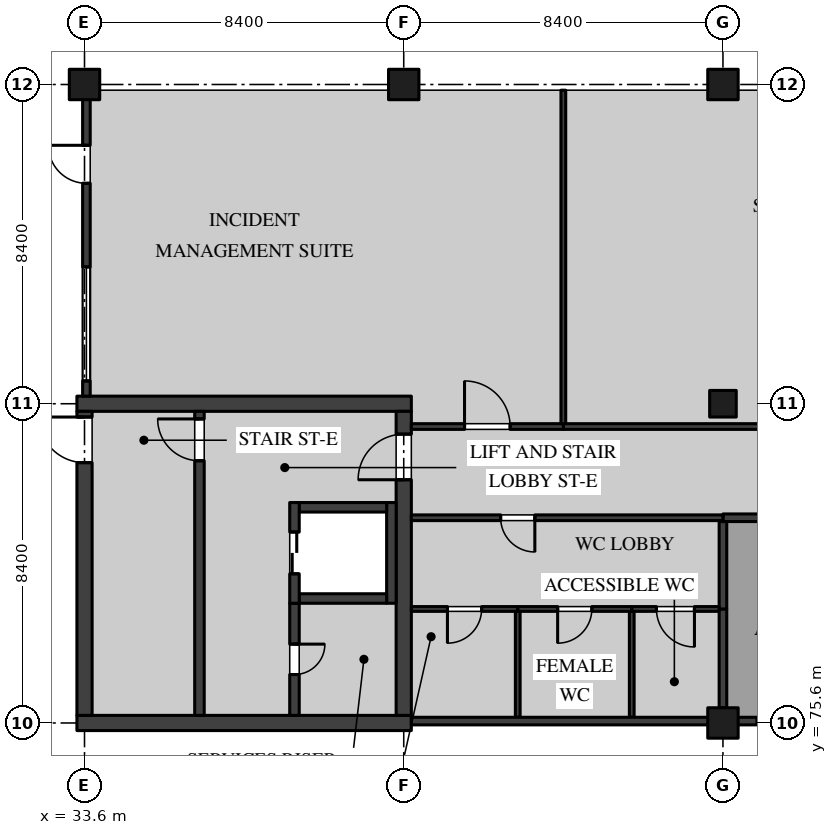
"""IFC4 building model, lengths in metres.
Left out: names, types, materials, properties, quantities, classifications, styles, units other than length and angle.
Written with IfcOpenShell. Run it as: python <this file> out.ifc"""

import sys

from ifc_helpers import new_model, si_unit, direction, frame, frame_2d, origin, origin_2d, place, context, subcontext, project, spatial, rectangle, extrude, element, fill, save


model = new_model("IFC4")
c1 = context("Model", 3, precision=1e-05, world=origin(), true_north=direction((0.0, 1.0)))
c2 = subcontext(c1, "Body", "Model", "MODEL_VIEW")
j1 = project(units=[si_unit("LENGTHUNIT", "METRE"), si_unit("PLANEANGLEUNIT", "RADIAN")], contexts=[c1])
p1 = place(None, origin())
s1 = spatial("IfcSite", under=j1, at=p1, CompositionType="ELEMENT")
p2 = place(p1, origin())
s2 = spatial("IfcBuilding", under=s1, at=p2, CompositionType="ELEMENT")
p3 = place(p2, origin())
s3 = spatial("IfcBuildingStorey", under=s2, at=p3, CompositionType="ELEMENT", Elevation=0.0)
for number, where, z_axis, x_axis in (
    (1, (33.6, 92.4, 0.0), (0.0, 0.0, 1.0), (1.0, 0.0, 0.0)),
    (2, (42.0, 92.4, 0.0), (0.0, 0.0, 1.0), (1.0, 0.0, 0.0)),
    (3, (50.4, 75.6, 0.0), (0.0, 0.0, 1.0), (1.0, 0.0, 0.0)),
):
    element("IfcColumn", number, at=place(p3, frame(where, z_axis=z_axis, x_axis=x_axis)), inside=s3, PredefinedType="COLUMN", context=c2, shape_type="SweptSolid", body=[
        extrude(rectangle(XDim=0.8, YDim=0.8, at=origin_2d()), origin(), (0.0, 0.0, 1.0), 5.05),
    ])
p4 = place(p3, frame((50.4, 84.0, 0.0), z_axis=(0.0, 0.0, 1.0), x_axis=(1.0, 0.0, 0.0)))
e4 = element("IfcColumn", 4, at=p4, inside=s3, PredefinedType="COLUMN", context=c2, shape_type="SweptSolid", body=[
    extrude(rectangle(XDim=0.7, YDim=0.7, at=origin_2d()), origin(), (0.0, 0.0, 1.0), 5.05),
])
p5 = place(p3, frame((50.4, 92.4, 0.0), z_axis=(0.0, 0.0, 1.0), x_axis=(1.0, 0.0, 0.0)))
e5 = element("IfcColumn", 5, at=p5, inside=s3, PredefinedType="COLUMN", context=c2, shape_type="SweptSolid", body=[
    extrude(rectangle(XDim=0.8, YDim=0.8, at=origin_2d()), origin(), (0.0, 0.0, 1.0), 5.05),
])
for number, where, z_axis, x_axis in (
    (6, (33.4, 75.6, 0.0), (0.0, 0.0, 1.0), (1.0, 0.0, 0.0)),
    (7, (33.4, 84.0, 0.0), (0.0, 0.0, 1.0), (1.0, 0.0, 0.0)),
):
    element("IfcWall", number, at=place(p3, frame(where, z_axis=z_axis, x_axis=x_axis)), inside=s3, PredefinedType="SHEAR", context=c2, shape_type="SweptSolid", body=[
        extrude(rectangle(XDim=8.8, YDim=0.4, at=frame_2d((4.4, 0.0))), origin(), (0.0, 0.0, 1.0), 5.05),
    ])
p6 = place(p3, frame((33.6, 75.8, 0.0), z_axis=(0.0, 0.0, 1.0), x_axis=(0.0, 1.0, 0.0)))
e8 = element("IfcWall", 8, at=p6, inside=s3, PredefinedType="SHEAR", context=c2, shape_type="SweptSolid", body=[
    extrude(rectangle(XDim=8.0, YDim=0.4, at=frame_2d((4.0, 0.0))), origin(), (0.0, 0.0, 1.0), 5.05),
])
p7 = place(p6, frame((6.65, 0.0, 0.0)))
e9 = element("IfcOpeningElement", 9, at=p7, cuts=e8, PredefinedType="OPENING", context=c2, shape_type="SweptSolid", body=[
    extrude(rectangle(XDim=1.2, YDim=2.1, at=frame_2d((0.6, 1.05))), frame((0.0, 0.21, 0.0), z_axis=(0.0, -1.0, 0.0), x_axis=(1.0, 0.0, 0.0)), (0.0, 0.0, 1.0), 0.42),
])
p8 = place(p3, frame((42.0, 75.8, 0.0), z_axis=(0.0, 0.0, 1.0), x_axis=(0.0, 1.0, 0.0)))
e10 = element("IfcWall", 10, at=p8, inside=s3, PredefinedType="SHEAR", context=c2, shape_type="SweptSolid", body=[
    extrude(rectangle(XDim=8.0, YDim=0.4, at=frame_2d((4.0, 0.0))), origin(), (0.0, 0.0, 1.0), 5.05),
])
p9 = place(p8, frame((6.2, 0.0, 0.0)))
e11 = element("IfcOpeningElement", 11, at=p9, cuts=e10, PredefinedType="OPENING", context=c2, shape_type="SweptSolid", body=[
    extrude(rectangle(XDim=1.2, YDim=2.1, at=frame_2d((0.6, 1.05))), frame((0.0, 0.21, 0.0), z_axis=(0.0, -1.0, 0.0), x_axis=(1.0, 0.0, 0.0)), (0.0, 0.0, 1.0), 0.42),
])
p10 = place(p3, frame((36.625, 83.8, 0.0), z_axis=(0.0, 0.0, 1.0), x_axis=(0.0, -1.0, 0.0)))
e12 = element("IfcWall", 12, at=p10, inside=s3, PredefinedType="SOLIDWALL", context=c2, shape_type="SweptSolid", body=[
    extrude(rectangle(XDim=8.0, YDim=0.25, at=frame_2d((4.0, 0.0))), origin(), (0.0, 0.0, 1.0), 5.05),
])
p11 = place(p10, frame((0.2, 0.0, 0.0)))
e13 = element("IfcOpeningElement", 13, at=p11, cuts=e12, PredefinedType="OPENING", context=c2, shape_type="SweptSolid", body=[
    extrude(rectangle(XDim=1.1, YDim=2.1, at=frame_2d((0.55, 1.05))), frame((0.0, 0.135, 0.0), z_axis=(0.0, -1.0, 0.0), x_axis=(1.0, 0.0, 0.0)), (0.0, 0.0, 1.0), 0.27),
])
p12 = place(p3, frame((39.125, 78.75, 0.0), z_axis=(0.0, 0.0, 1.0), x_axis=(0.0, -1.0, 0.0)))
e14 = element("IfcWall", 14, at=p12, inside=s3, PredefinedType="SOLIDWALL", context=c2, shape_type="SweptSolid", body=[
    extrude(rectangle(XDim=2.95, YDim=0.25, at=frame_2d((1.475, 0.0))), origin(), (0.0, 0.0, 1.0), 5.05),
])
p13 = place(p12, frame((1.075, 0.0, 0.0)))
e15 = element("IfcOpeningElement", 15, at=p13, cuts=e14, PredefinedType="OPENING", context=c2, shape_type="SweptSolid", body=[
    extrude(rectangle(XDim=0.8, YDim=2.1, at=frame_2d((0.4, 1.05))), frame((0.0, 0.135, 0.0), z_axis=(0.0, -1.0, 0.0), x_axis=(1.0, 0.0, 0.0)), (0.0, 0.0, 1.0), 0.27),
])
p14 = place(p3, frame((41.675, 78.75, 0.0), z_axis=(0.0, 0.0, 1.0), x_axis=(0.0, 1.0, 0.0)))
e16 = element("IfcWall", 16, at=p14, inside=s3, PredefinedType="SOLIDWALL", context=c2, shape_type="SweptSolid", body=[
    extrude(rectangle(XDim=2.65, YDim=0.25, at=frame_2d((1.325, 0.0))), origin(), (0.0, 0.0, 1.0), 5.05),
])
for number, where, z_axis, x_axis in (
    (17, (39.25, 81.275, 0.0), (0.0, 0.0, 1.0), (1.0, 0.0, 0.0)),
    (18, (39.25, 78.875, 0.0), (0.0, 0.0, 1.0), (1.0, 0.0, 0.0)),
):
    element("IfcWall", number, at=place(p3, frame(where, z_axis=z_axis, x_axis=x_axis)), inside=s3, PredefinedType="SOLIDWALL", context=c2, shape_type="SweptSolid", body=[
        extrude(rectangle(XDim=2.3, YDim=0.25, at=frame_2d((1.15, 0.0))), origin(), (0.0, 0.0, 1.0), 5.05),
    ])
p15 = place(p3, frame((39.125, 78.75, 0.0), z_axis=(0.0, 0.0, 1.0), x_axis=(0.0, 1.0, 0.0)))
e19 = element("IfcWall", 19, at=p15, inside=s3, PredefinedType="SOLIDWALL", context=c2, shape_type="SweptSolid", body=[
    extrude(rectangle(XDim=2.65, YDim=0.25, at=frame_2d((1.325, 0.0))), origin(), (0.0, 0.0, 1.0), 5.05),
])
p16 = place(p15, frame((0.775, 0.0, 0.0)))
e20 = element("IfcOpeningElement", 20, at=p16, cuts=e19, PredefinedType="OPENING", context=c2, shape_type="SweptSolid", body=[
    extrude(rectangle(XDim=1.1, YDim=2.1, at=frame_2d((0.55, 1.05))), frame((0.0, 0.135, 0.0), z_axis=(0.0, -1.0, 0.0), x_axis=(1.0, 0.0, 0.0)), (0.0, 0.0, 1.0), 0.27),
])
p17 = place(p3, frame((46.2, 83.4, 0.0), z_axis=(0.0, 0.0, 1.0), x_axis=(1.0, 0.0, 0.0)))
e21 = element("IfcWall", 21, at=p17, inside=s3, PredefinedType="PARTITIONING", context=c2, shape_type="SweptSolid", body=[
    extrude(rectangle(XDim=10.275, YDim=0.15, at=frame_2d((5.138, 0.0))), origin(), (0.0, 0.0, 1.0), 5.05),
])
p18 = place(p3, frame((42.2, 83.4, 0.0), z_axis=(0.0, 0.0, 1.0), x_axis=(1.0, 0.0, 0.0)))
e22 = element("IfcWall", 22, at=p18, inside=s3, PredefinedType="PARTITIONING", context=c2, shape_type="SweptSolid", body=[
    extrude(rectangle(XDim=4.0, YDim=0.15, at=frame_2d((2.0, 0.0))), origin(), (0.0, 0.0, 1.0), 5.05),
])
p19 = place(p18, frame((1.4, 0.0, 0.0)))
e23 = element("IfcOpeningElement", 23, at=p19, cuts=e22, PredefinedType="OPENING", context=c2, shape_type="SweptSolid", body=[
    extrude(rectangle(XDim=1.2, YDim=2.4, at=frame_2d((0.6, 1.2))), frame((0.0, 0.085, 0.0), z_axis=(0.0, -1.0, 0.0), x_axis=(1.0, 0.0, 0.0)), (0.0, 0.0, 1.0), 0.17),
])
p20 = place(p3, frame((50.4, 81.0, 0.0), z_axis=(0.0, 0.0, 1.0), x_axis=(1.0, 0.0, 0.0)))
e24 = element("IfcWall", 24, at=p20, inside=s3, PredefinedType="PARTITIONING", context=c2, shape_type="SweptSolid", body=[
    extrude(rectangle(XDim=4.2, YDim=0.2, at=frame_2d((2.1, 0.0))), origin(), (0.0, 0.0, 1.0), 5.05),
])
p21 = place(p20, frame((1.6, 0.0, 0.0)))
e25 = element("IfcOpeningElement", 25, at=p21, cuts=e24, PredefinedType="OPENING", context=c2, shape_type="SweptSolid", body=[
    extrude(rectangle(XDim=1.0, YDim=2.1, at=frame_2d((0.5, 1.05))), frame((0.0, 0.11, 0.0), z_axis=(0.0, -1.0, 0.0), x_axis=(1.0, 0.0, 0.0)), (0.0, 0.0, 1.0), 0.22),
])
p22 = place(p3, frame((42.2, 81.0, 0.0), z_axis=(0.0, 0.0, 1.0), x_axis=(1.0, 0.0, 0.0)))
e26 = element("IfcWall", 26, at=p22, inside=s3, PredefinedType="PARTITIONING", context=c2, shape_type="SweptSolid", body=[
    extrude(rectangle(XDim=8.2, YDim=0.15, at=frame_2d((4.1, 0.0))), origin(), (0.0, 0.0, 1.0), 5.05),
])
p23 = place(p22, frame((2.35, 0.0, 0.0)))
e27 = element("IfcOpeningElement", 27, at=p23, cuts=e26, PredefinedType="OPENING", context=c2, shape_type="SweptSolid", body=[
    extrude(rectangle(XDim=0.9, YDim=2.1, at=frame_2d((0.45, 1.05))), frame((0.0, 0.085, 0.0), z_axis=(0.0, -1.0, 0.0), x_axis=(1.0, 0.0, 0.0)), (0.0, 0.0, 1.0), 0.17),
])
p24 = place(p3, frame((46.2, 83.475, 0.0), z_axis=(0.0, 0.0, 1.0), x_axis=(0.0, 1.0, 0.0)))
e28 = element("IfcWall", 28, at=p24, inside=s3, PredefinedType="PARTITIONING", context=c2, shape_type="SweptSolid", body=[
    extrude(rectangle(XDim=8.775, YDim=0.125, at=frame_2d((4.387, 0.0))), origin(), (0.0, 0.0, 1.0), 5.05),
])
p25 = place(p3, frame((50.4, 76.0, 0.0), z_axis=(0.0, 0.0, 1.0), x_axis=(0.0, 1.0, 0.0)))
e29 = element("IfcWall", 29, at=p25, inside=s3, PredefinedType="PARTITIONING", context=c2, shape_type="SweptSolid", body=[
    extrude(rectangle(XDim=2.6, YDim=0.2, at=frame_2d((1.3, 0.0))), origin(), (0.0, 0.0, 1.0), 5.05),
])
p26 = place(p3, frame((50.4, 78.6, 0.0), z_axis=(0.0, 0.0, 1.0), x_axis=(0.0, 1.0, 0.0)))
e30 = element("IfcWall", 30, at=p26, inside=s3, PredefinedType="PARTITIONING", context=c2, shape_type="SweptSolid", body=[
    extrude(rectangle(XDim=2.3, YDim=0.2, at=frame_2d((1.15, 0.0))), origin(), (0.0, 0.0, 1.0), 5.05),
])
p27 = place(p3, frame((48.0, 75.75, 0.0), z_axis=(0.0, 0.0, 1.0), x_axis=(0.0, 1.0, 0.0)))
e31 = element("IfcWall", 31, at=p27, inside=s3, PredefinedType="PARTITIONING", context=c2, shape_type="SweptSolid", body=[
    extrude(rectangle(XDim=2.787, YDim=0.125, at=frame_2d((1.394, 0.0))), origin(), (0.0, 0.0, 1.0), 5.05),
])
p28 = place(p3, frame((48.0, 78.6, 0.0), z_axis=(0.0, 0.0, 1.0), x_axis=(1.0, 0.0, 0.0)))
e32 = element("IfcWall", 32, at=p28, inside=s3, PredefinedType="PARTITIONING", context=c2, shape_type="SweptSolid", body=[
    extrude(rectangle(XDim=2.3, YDim=0.125, at=frame_2d((1.15, 0.0))), origin(), (0.0, 0.0, 1.0), 5.05),
])
p29 = place(p28, frame((0.65, 0.0, 0.0)))
e33 = element("IfcOpeningElement", 33, at=p29, cuts=e32, PredefinedType="OPENING", context=c2, shape_type="SweptSolid", body=[
    extrude(rectangle(XDim=1.0, YDim=2.1, at=frame_2d((0.5, 1.05))), frame((0.0, 0.073, 0.0), z_axis=(0.0, -1.0, 0.0), x_axis=(1.0, 0.0, 0.0)), (0.0, 0.0, 1.0), 0.145),
])
p30 = place(p3, frame((45.0, 78.6, 0.0), z_axis=(0.0, 0.0, 1.0), x_axis=(1.0, 0.0, 0.0)))
e34 = element("IfcWall", 34, at=p30, inside=s3, PredefinedType="PARTITIONING", context=c2, shape_type="SweptSolid", body=[
    extrude(rectangle(XDim=3.0, YDim=0.125, at=frame_2d((1.5, 0.0))), origin(), (0.0, 0.0, 1.0), 5.05),
])
p31 = place(p30, frame((1.05, 0.0, 0.0)))
e35 = element("IfcOpeningElement", 35, at=p31, cuts=e34, PredefinedType="OPENING", context=c2, shape_type="SweptSolid", body=[
    extrude(rectangle(XDim=0.9, YDim=2.1, at=frame_2d((0.45, 1.05))), frame((0.0, 0.073, 0.0), z_axis=(0.0, -1.0, 0.0), x_axis=(1.0, 0.0, 0.0)), (0.0, 0.0, 1.0), 0.145),
])
p32 = place(p3, frame((45.0, 75.75, 0.0), z_axis=(0.0, 0.0, 1.0), x_axis=(0.0, 1.0, 0.0)))
e36 = element("IfcWall", 36, at=p32, inside=s3, PredefinedType="PARTITIONING", context=c2, shape_type="SweptSolid", body=[
    extrude(rectangle(XDim=2.787, YDim=0.125, at=frame_2d((1.394, 0.0))), origin(), (0.0, 0.0, 1.0), 5.05),
])
p33 = place(p3, frame((42.2, 78.6, 0.0), z_axis=(0.0, 0.0, 1.0), x_axis=(1.0, 0.0, 0.0)))
e37 = element("IfcWall", 37, at=p33, inside=s3, PredefinedType="PARTITIONING", context=c2, shape_type="SweptSolid", body=[
    extrude(rectangle(XDim=2.8, YDim=0.125, at=frame_2d((1.4, 0.0))), origin(), (0.0, 0.0, 1.0), 5.05),
])
p34 = place(p33, frame((0.95, 0.0, 0.0)))
e38 = element("IfcOpeningElement", 38, at=p34, cuts=e37, PredefinedType="OPENING", context=c2, shape_type="SweptSolid", body=[
    extrude(rectangle(XDim=0.9, YDim=2.1, at=frame_2d((0.45, 1.05))), frame((0.0, 0.073, 0.0), z_axis=(0.0, -1.0, 0.0), x_axis=(1.0, 0.0, 0.0)), (0.0, 0.0, 1.0), 0.145),
])
p35 = place(p3, frame((33.65, 92.02, 0.0), z_axis=(0.0, 0.0, 1.0), x_axis=(0.0, -1.0, 0.0)))
e39 = element("IfcWall", 39, at=p35, inside=s3, PredefinedType="SOLIDWALL", context=c2, shape_type="SweptSolid", body=[
    extrude(rectangle(XDim=7.82, YDim=0.2, at=frame_2d((3.91, 0.0))), origin(), (0.0, 0.0, 1.0), 5.05),
])
p36 = place(p35, frame((1.22, 0.0, 0.0)))
e40 = element("IfcOpeningElement", 40, at=p36, cuts=e39, PredefinedType="OPENING", context=c2, shape_type="SweptSolid", body=[
    extrude(rectangle(XDim=1.0, YDim=2.4, at=frame_2d((0.5, 1.2))), frame((0.0, 0.11, 0.0), z_axis=(0.0, -1.0, 0.0), x_axis=(1.0, 0.0, 0.0)), (0.0, 0.0, 1.0), 0.22),
])
p37 = place(p35, frame((4.42, 0.0, 0.9)))
e41 = element("IfcOpeningElement", 41, at=p37, cuts=e39, PredefinedType="OPENING", context=c2, shape_type="SweptSolid", body=[
    extrude(rectangle(XDim=3.0, YDim=2.85, at=frame_2d((1.5, 1.425))), frame((0.0, 0.11, 0.0), z_axis=(0.0, -1.0, 0.0), x_axis=(1.0, 0.0, 0.0)), (0.0, 0.0, 1.0), 0.22),
])
p38 = place(p3, frame((42.2, 75.65, 0.0), z_axis=(0.0, 0.0, 1.0), x_axis=(1.0, 0.0, 0.0)))
e42 = element("IfcWall", 42, at=p38, inside=s3, PredefinedType="SOLIDWALL", context=c2, shape_type="SweptSolid", body=[
    extrude(rectangle(XDim=7.82, YDim=0.2, at=frame_2d((3.91, 0.0))), origin(), (0.0, 0.0, 1.0), 5.05),
])
p39 = place(p3, frame((50.78, 75.65, 0.0), z_axis=(0.0, 0.0, 1.0), x_axis=(1.0, 0.0, 0.0)))
e43 = element("IfcWall", 43, at=p39, inside=s3, PredefinedType="SOLIDWALL", context=c2, shape_type="SweptSolid", body=[
    extrude(rectangle(XDim=7.64, YDim=0.2, at=frame_2d((3.82, 0.0))), origin(), (0.0, 0.0, 1.0), 5.05),
])
p40 = place(p39, frame((0.52, 0.0, 0.9)))
e44 = element("IfcOpeningElement", 44, at=p40, cuts=e43, PredefinedType="OPENING", context=c2, shape_type="SweptSolid", body=[
    extrude(rectangle(XDim=2.4, YDim=2.85, at=frame_2d((1.2, 1.425))), frame((0.0, 0.11, 0.0), z_axis=(0.0, -1.0, 0.0), x_axis=(1.0, 0.0, 0.0)), (0.0, 0.0, 1.0), 0.22),
])
p41 = place(p9, origin())
e45 = element("IfcDoor", 45, at=p41, inside=s3, OperationType="SINGLE_SWING_RIGHT", PredefinedType="DOOR", context=c2, shape_type="SweptSolid", body=[
    extrude(rectangle(XDim=1.2, YDim=2.1, at=frame_2d((0.6, 1.05))), frame((0.0, 0.035, 0.0), z_axis=(0.0, -1.0, 0.0), x_axis=(1.0, 0.0, 0.0)), (0.0, 0.0, 1.0), 0.07),
])
fill(e11, e45)
p42 = place(p13, origin())
e46 = element("IfcDoor", 46, at=p42, inside=s3, OperationType="SINGLE_SWING_RIGHT", PredefinedType="DOOR", context=c2, shape_type="SweptSolid", body=[
    extrude(rectangle(XDim=0.8, YDim=2.1, at=frame_2d((0.4, 1.05))), frame((0.0, 0.035, 0.0), z_axis=(0.0, -1.0, 0.0), x_axis=(1.0, 0.0, 0.0)), (0.0, 0.0, 1.0), 0.07),
])
fill(e15, e46)
p43 = place(p11, frame((1.1, 0.0, 0.0), z_axis=(0.0, 0.0, 1.0), x_axis=(-1.0, 0.0, 0.0)))
e47 = element("IfcDoor", 47, at=p43, inside=s3, OperationType="SINGLE_SWING_LEFT", PredefinedType="DOOR", context=c2, shape_type="SweptSolid", body=[
    extrude(rectangle(XDim=1.1, YDim=2.1, at=frame_2d((0.55, 1.05))), frame((0.0, 0.035, 0.0), z_axis=(0.0, -1.0, 0.0), x_axis=(1.0, 0.0, 0.0)), (0.0, 0.0, 1.0), 0.07),
])
fill(e13, e47)
p44 = place(p7, origin())
e48 = element("IfcDoor", 48, at=p44, inside=s3, OperationType="SINGLE_SWING_LEFT", PredefinedType="DOOR", context=c2, shape_type="SweptSolid", body=[
    extrude(rectangle(XDim=1.2, YDim=2.1, at=frame_2d((0.6, 1.05))), frame((0.0, 0.035, 0.0), z_axis=(0.0, -1.0, 0.0), x_axis=(1.0, 0.0, 0.0)), (0.0, 0.0, 1.0), 0.07),
])
fill(e9, e48)
p45 = place(p16, origin())
e49 = element("IfcDoor", 49, at=p45, inside=s3, OperationType="DOUBLE_DOOR_SLIDING", PredefinedType="DOOR", context=c2, shape_type="SweptSolid", body=[
    extrude(rectangle(XDim=1.1, YDim=2.1, at=frame_2d((0.55, 1.05))), frame((0.0, 0.04, 0.0), z_axis=(0.0, -1.0, 0.0), x_axis=(1.0, 0.0, 0.0)), (0.0, 0.0, 1.0), 0.08),
])
fill(e20, e49)
p46 = place(p19, origin())
e50 = element("IfcDoor", 50, at=p46, inside=s3, OperationType="SINGLE_SWING_RIGHT", PredefinedType="DOOR", context=c2, shape_type="SweptSolid", body=[
    extrude(rectangle(XDim=1.2, YDim=2.4, at=frame_2d((0.6, 1.2))), frame((0.0, 0.025, 0.0), z_axis=(0.0, -1.0, 0.0), x_axis=(1.0, 0.0, 0.0)), (0.0, 0.0, 1.0), 0.05),
])
fill(e23, e50)
p47 = place(p29, frame((1.0, 0.0, 0.0), z_axis=(0.0, 0.0, 1.0), x_axis=(-1.0, 0.0, 0.0)))
e51 = element("IfcDoor", 51, at=p47, inside=s3, OperationType="SINGLE_SWING_RIGHT", PredefinedType="DOOR", context=c2, shape_type="SweptSolid", body=[
    extrude(rectangle(XDim=1.0, YDim=2.1, at=frame_2d((0.5, 1.05))), frame((0.0, 0.02, 0.0), z_axis=(0.0, -1.0, 0.0), x_axis=(1.0, 0.0, 0.0)), (0.0, 0.0, 1.0), 0.04),
])
fill(e33, e51)
p48 = place(p31, frame((0.9, 0.0, 0.0), z_axis=(0.0, 0.0, 1.0), x_axis=(-1.0, 0.0, 0.0)))
e52 = element("IfcDoor", 52, at=p48, inside=s3, OperationType="SINGLE_SWING_LEFT", PredefinedType="DOOR", context=c2, shape_type="SweptSolid", body=[
    extrude(rectangle(XDim=0.9, YDim=2.1, at=frame_2d((0.45, 1.05))), frame((0.0, 0.02, 0.0), z_axis=(0.0, -1.0, 0.0), x_axis=(1.0, 0.0, 0.0)), (0.0, 0.0, 1.0), 0.04),
])
fill(e35, e52)
p49 = place(p23, frame((0.9, 0.0, 0.0), z_axis=(0.0, 0.0, 1.0), x_axis=(-1.0, 0.0, 0.0)))
e53 = element("IfcDoor", 53, at=p49, inside=s3, OperationType="SINGLE_SWING_RIGHT", PredefinedType="DOOR", context=c2, shape_type="SweptSolid", body=[
    extrude(rectangle(XDim=0.9, YDim=2.1, at=frame_2d((0.45, 1.05))), frame((0.0, 0.025, 0.0), z_axis=(0.0, -1.0, 0.0), x_axis=(1.0, 0.0, 0.0)), (0.0, 0.0, 1.0), 0.05),
])
fill(e27, e53)
p50 = place(p34, frame((0.9, 0.0, 0.0), z_axis=(0.0, 0.0, 1.0), x_axis=(-1.0, 0.0, 0.0)))
e54 = element("IfcDoor", 54, at=p50, inside=s3, OperationType="SINGLE_SWING_LEFT", PredefinedType="DOOR", context=c2, shape_type="SweptSolid", body=[
    extrude(rectangle(XDim=0.9, YDim=2.1, at=frame_2d((0.45, 1.05))), frame((0.0, 0.02, 0.0), z_axis=(0.0, -1.0, 0.0), x_axis=(1.0, 0.0, 0.0)), (0.0, 0.0, 1.0), 0.04),
])
fill(e38, e54)
p51 = place(p36, frame((1.0, 0.0, 0.0), z_axis=(0.0, 0.0, 1.0), x_axis=(-1.0, 0.0, 0.0)))
e55 = element("IfcDoor", 55, at=p51, inside=s3, OperationType="SINGLE_SWING_LEFT", PredefinedType="DOOR", context=c2, shape_type="SweptSolid", body=[
    extrude(rectangle(XDim=1.0, YDim=2.4, at=frame_2d((0.5, 1.2))), frame((0.0, 0.025, 0.0), z_axis=(0.0, -1.0, 0.0), x_axis=(1.0, 0.0, 0.0)), (0.0, 0.0, 1.0), 0.05),
])
fill(e40, e55)
p52 = place(p37, origin())
e56 = element("IfcWindow", 56, at=p52, inside=s3, PartitioningType="SINGLE_PANEL", PredefinedType="WINDOW", context=c2, shape_type="SweptSolid", body=[
    extrude(rectangle(XDim=3.0, YDim=2.85, at=frame_2d((1.5, 1.425))), frame((0.0, 0.05, 0.0), z_axis=(0.0, -1.0, 0.0), x_axis=(1.0, 0.0, 0.0)), (0.0, 0.0, 1.0), 0.1),
])
fill(e41, e56)
save(model, sys.argv[1])
